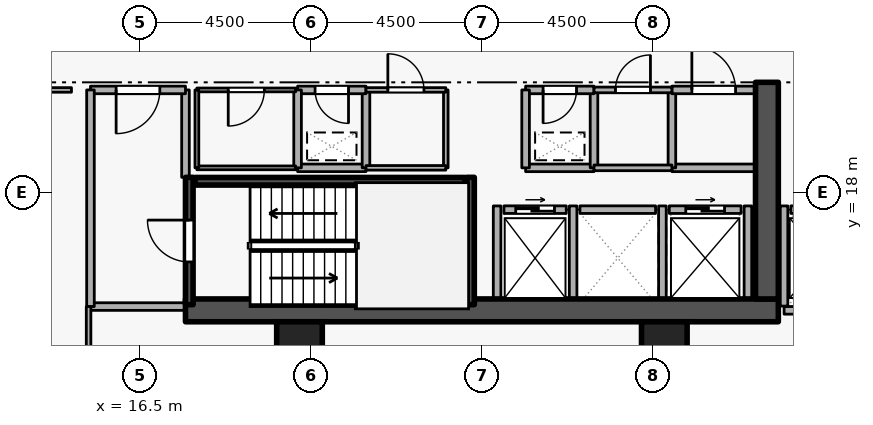
"""IFC4 building model, lengths in metres.
Left out: names, types, materials, properties, quantities, classifications, styles, units other than length and angle.
Written with IfcOpenShell. Run it as: python <this file> out.ifc"""

import sys

from ifc_helpers import new_model, si_unit, direction, frame, frame_2d, origin, origin_2d, place, context, subcontext, project, spatial, rectangle, extrude, element, fill, save


model = new_model("IFC4")
c1 = context("Model", 3, precision=1e-05, world=origin(), true_north=direction((0.0, 1.0)))
c2 = subcontext(c1, "Body", "Model", "MODEL_VIEW")
j1 = project(units=[si_unit("LENGTHUNIT", "METRE"), si_unit("PLANEANGLEUNIT", "RADIAN")], contexts=[c1])
p1 = place(None, origin())
s1 = spatial("IfcSite", under=j1, at=p1, CompositionType="ELEMENT")
p2 = place(p1, origin())
s2 = spatial("IfcBuilding", under=s1, at=p2, CompositionType="ELEMENT")
p3 = place(p2, frame((0.0, 0.0, 101.7)))
s3 = spatial("IfcBuildingStorey", under=s2, at=p3, CompositionType="ELEMENT", Elevation=101.7)
p4 = place(p3, frame((17.7, 14.9, 0.0), z_axis=(0.0, 0.0, 1.0), x_axis=(1.0, 0.0, 0.0)))
e1 = element("IfcWall", 1, at=p4, inside=s3, PredefinedType="SHEAR", context=c2, shape_type="SweptSolid", body=[
    extrude(rectangle(XDim=15.6, YDim=0.6, at=frame_2d((7.8, 0.0))), origin(), (0.0, 0.0, 1.0), 3.6),
])
p5 = place(p3, frame((33.0, 15.2, 0.0), z_axis=(0.0, 0.0, 1.0), x_axis=(0.0, 1.0, 0.0)))
e2 = element("IfcWall", 2, at=p5, inside=s3, PredefinedType="SHEAR", context=c2, shape_type="SweptSolid", body=[
    extrude(rectangle(XDim=5.7, YDim=0.6, at=frame_2d((2.85, 0.0))), origin(), (0.0, 0.0, 1.0), 3.6),
])
for number, where, z_axis, x_axis in (
    (3, (20.7, 14.0, 0.0), (0.0, 0.0, 1.0), (1.0, 0.0, 0.0)),
    (4, (30.3, 14.0, 0.0), (0.0, 0.0, 1.0), (1.0, 0.0, 0.0)),
):
    element("IfcColumn", number, at=place(p3, frame(where, z_axis=z_axis, x_axis=x_axis)), inside=s3, PredefinedType="COLUMN", context=c2, shape_type="SweptSolid", body=[
        extrude(rectangle(XDim=1.2, YDim=1.2, at=origin_2d()), origin(), (0.0, 0.0, 1.0), 3.6),
    ])
p6 = place(p3, frame((26.08, 17.55, 0.0), z_axis=(0.0, 0.0, 1.0), x_axis=(1.0, 0.0, 0.0)))
e5 = element("IfcWall", 5, at=p6, inside=s3, PredefinedType="STANDARD", context=c2, shape_type="SweptSolid", body=[
    extrude(rectangle(XDim=1.64, YDim=0.2, at=frame_2d((0.82, 0.0))), origin(), (0.0, 0.0, 1.0), 3.34),
])
p7 = place(p6, frame((0.31, 0.0, 0.0)))
e6 = element("IfcOpeningElement", 6, at=p7, cuts=e5, PredefinedType="OPENING", context=c2, shape_type="SweptSolid", body=[
    extrude(rectangle(XDim=1.02, YDim=2.06, at=frame_2d((0.51, 1.03))), frame((0.0, 0.11, 0.0), z_axis=(0.0, -1.0, 0.0), x_axis=(1.0, 0.0, 0.0)), (0.0, 0.0, 1.0), 0.22),
])
p8 = place(p3, frame((28.08, 17.55, 0.0), z_axis=(0.0, 0.0, 1.0), x_axis=(1.0, 0.0, 0.0)))
e7 = element("IfcWall", 7, at=p8, inside=s3, PredefinedType="STANDARD", context=c2, shape_type="SweptSolid", body=[
    extrude(rectangle(XDim=1.99, YDim=0.2, at=frame_2d((0.995, 0.0))), origin(), (0.0, 0.0, 1.0), 3.34),
])
p9 = place(p3, frame((30.43, 17.55, 0.0), z_axis=(0.0, 0.0, 1.0), x_axis=(1.0, 0.0, 0.0)))
e8 = element("IfcWall", 8, at=p9, inside=s3, PredefinedType="STANDARD", context=c2, shape_type="SweptSolid", body=[
    extrude(rectangle(XDim=1.89, YDim=0.2, at=frame_2d((0.945, 0.0))), origin(), (0.0, 0.0, 1.0), 3.34),
])
p10 = place(p9, frame((0.435, 0.0, 0.0)))
e9 = element("IfcOpeningElement", 9, at=p10, cuts=e8, PredefinedType="OPENING", context=c2, shape_type="SweptSolid", body=[
    extrude(rectangle(XDim=1.02, YDim=2.06, at=frame_2d((0.51, 1.03))), frame((0.0, 0.11, 0.0), z_axis=(0.0, -1.0, 0.0), x_axis=(1.0, 0.0, 0.0)), (0.0, 0.0, 1.0), 0.22),
])
p11 = place(p3, frame((33.63, 17.55, 0.0), z_axis=(0.0, 0.0, 1.0), x_axis=(1.0, 0.0, 0.0)))
e10 = element("IfcWall", 10, at=p11, inside=s3, PredefinedType="STANDARD", context=c2, shape_type="SweptSolid", body=[
    extrude(rectangle(XDim=1.74, YDim=0.2, at=frame_2d((0.87, 0.0))), origin(), (0.0, 0.0, 1.0), 3.34),
])
p12 = place(p11, frame((0.36, 0.0, 0.0)))
e11 = element("IfcOpeningElement", 11, at=p12, cuts=e10, PredefinedType="OPENING", context=c2, shape_type="SweptSolid", body=[
    extrude(rectangle(XDim=1.02, YDim=2.06, at=frame_2d((0.51, 1.03))), frame((0.0, 0.11, 0.0), z_axis=(0.0, -1.0, 0.0), x_axis=(1.0, 0.0, 0.0)), (0.0, 0.0, 1.0), 0.22),
])
for number, where, z_axis, x_axis in (
    (12, (27.9, 15.212, 0.0), (0.0, 0.0, 1.0), (0.0, 1.0, 0.0)),
    (13, (25.9, 15.212, 0.0), (0.0, 0.0, 1.0), (0.0, 1.0, 0.0)),
    (14, (30.25, 15.212, 0.0), (0.0, 0.0, 1.0), (0.0, 1.0, 0.0)),
    (15, (32.5, 15.212, 0.0), (0.0, 0.0, 1.0), (0.0, 1.0, 0.0)),
):
    element("IfcWall", number, at=place(p3, frame(where, z_axis=z_axis, x_axis=x_axis)), inside=s3, PredefinedType="STANDARD", context=c2, shape_type="SweptSolid", body=[
        extrude(rectangle(XDim=2.436, YDim=0.2, at=frame_2d((1.218, 0.0))), origin(), (0.0, 0.0, 1.0), 3.34),
    ])
p13 = place(p3, frame((33.452, 14.9, 0.0), z_axis=(0.0, 0.0, 1.0), x_axis=(1.0, 0.0, 0.0)))
e16 = element("IfcWall", 16, at=p13, inside=s3, PredefinedType="STANDARD", context=c2, shape_type="SweptSolid", body=[
    extrude(rectangle(XDim=4.196, YDim=0.2, at=frame_2d((2.098, 0.0))), origin(), (0.0, 0.0, 1.0), 3.34),
])
p14 = place(p3, frame((33.45, 15.012, 0.0), z_axis=(0.0, 0.0, 1.0), x_axis=(0.0, 1.0, 0.0)))
e17 = element("IfcWall", 17, at=p14, inside=s3, PredefinedType="STANDARD", context=c2, shape_type="SweptSolid", body=[
    extrude(rectangle(XDim=2.636, YDim=0.2, at=frame_2d((1.318, 0.0))), origin(), (0.0, 0.0, 1.0), 3.34),
])
p15 = place(p3, frame((17.8, 15.05, 0.0), z_axis=(0.0, 0.0, 1.0), x_axis=(0.0, 1.0, 0.0)))
e18 = element("IfcWall", 18, at=p15, inside=s3, PredefinedType="SHEAR", context=c2, shape_type="SweptSolid", body=[
    extrude(rectangle(XDim=3.35, YDim=0.2, at=frame_2d((1.675, 0.0))), origin(), (0.0, 0.0, 1.0), 3.6),
])
p16 = place(p15, frame((1.125, 0.0, 0.0)))
e19 = element("IfcOpeningElement", 19, at=p16, cuts=e18, PredefinedType="OPENING", context=c2, shape_type="SweptSolid", body=[
    extrude(rectangle(XDim=1.1, YDim=2.1, at=frame_2d((0.55, 1.05))), frame((0.0, 0.11, 0.0), z_axis=(0.0, -1.0, 0.0), x_axis=(1.0, 0.0, 0.0)), (0.0, 0.0, 1.0), 0.22),
])
p17 = place(p3, frame((25.2, 18.4, 0.0), z_axis=(0.0, 0.0, 1.0), x_axis=(0.0, -1.0, 0.0)))
e20 = element("IfcWall", 20, at=p17, inside=s3, PredefinedType="SHEAR", context=c2, shape_type="SweptSolid", body=[
    extrude(rectangle(XDim=3.35, YDim=0.2, at=frame_2d((1.675, 0.0))), origin(), (0.0, 0.0, 1.0), 3.6),
])
p18 = place(p3, frame((25.05, 18.297, 0.0), z_axis=(0.0, 0.0, 1.0), x_axis=(-1.0, 0.0, 0.0)))
e21 = element("IfcWall", 21, at=p18, inside=s3, PredefinedType="SHEAR", context=c2, shape_type="SweptSolid", body=[
    extrude(rectangle(XDim=7.1, YDim=0.2, at=frame_2d((3.55, 0.0))), origin(), (0.0, 0.0, 1.0), 3.6),
])
p19 = place(p3, frame((15.2, 15.0, 0.0), z_axis=(0.0, 0.0, 1.0), x_axis=(1.0, 0.0, 0.0)))
e22 = element("IfcWall", 22, at=p19, inside=s3, PredefinedType="STANDARD", context=c2, shape_type="SweptSolid", body=[
    extrude(rectangle(XDim=2.5, YDim=0.2, at=frame_2d((1.25, 0.0))), origin(), (0.0, 0.0, 1.0), 3.34),
])
p20 = place(p3, frame((17.7, 18.4, 0.0), z_axis=(0.0, 0.0, 1.0), x_axis=(0.0, 1.0, 0.0)))
e23 = element("IfcWall", 23, at=p20, inside=s3, PredefinedType="STANDARD", context=c2, shape_type="SweptSolid", body=[
    extrude(rectangle(XDim=2.3, YDim=0.2, at=frame_2d((1.15, 0.0))), origin(), (0.0, 0.0, 1.0), 2.545),
])
p21 = place(p3, frame((17.7, 20.7, 0.0), z_axis=(0.0, 0.0, 1.0), x_axis=(-1.0, 0.0, 0.0)))
e24 = element("IfcWall", 24, at=p21, inside=s3, PredefinedType="STANDARD", context=c2, shape_type="SweptSolid", body=[
    extrude(rectangle(XDim=2.5, YDim=0.2, at=frame_2d((1.25, 0.0))), origin(), (0.0, 0.0, 1.0), 3.34),
])
p22 = place(p21, frame((0.675, 0.0, 0.0)))
e25 = element("IfcOpeningElement", 25, at=p22, cuts=e24, PredefinedType="OPENING", context=c2, shape_type="SweptSolid", body=[
    extrude(rectangle(XDim=1.15, YDim=2.1, at=frame_2d((0.575, 1.05))), frame((0.0, 0.11, 0.0), z_axis=(0.0, -1.0, 0.0), x_axis=(1.0, 0.0, 0.0)), (0.0, 0.0, 1.0), 0.22),
])
p23 = place(p3, frame((15.2, 20.7, 0.0), z_axis=(0.0, 0.0, 1.0), x_axis=(0.0, -1.0, 0.0)))
e26 = element("IfcWall", 26, at=p23, inside=s3, PredefinedType="STANDARD", context=c2, shape_type="SweptSolid", body=[
    extrude(rectangle(XDim=5.7, YDim=0.2, at=frame_2d((2.85, 0.0))), origin(), (0.0, 0.0, 1.0), 3.34),
])
p24 = place(p3, frame((26.65, 18.65, 0.0), z_axis=(0.0, 0.0, 1.0), x_axis=(1.0, 0.0, 0.0)))
e27 = element("IfcWall", 27, at=p24, inside=s3, PredefinedType="STANDARD", context=c2, shape_type="SweptSolid", body=[
    extrude(rectangle(XDim=1.8, YDim=0.2, at=frame_2d((0.9, 0.0))), origin(), (0.0, 0.0, 1.0), 3.34),
])
p25 = place(p3, frame((28.45, 18.65, 0.0), z_axis=(0.0, 0.0, 1.0), x_axis=(0.0, 1.0, 0.0)))
e28 = element("IfcWall", 28, at=p25, inside=s3, PredefinedType="STANDARD", context=c2, shape_type="SweptSolid", body=[
    extrude(rectangle(XDim=2.05, YDim=0.2, at=frame_2d((1.025, 0.0))), origin(), (0.0, 0.0, 1.0), 3.34),
])
p26 = place(p3, frame((28.45, 20.7, 0.0), z_axis=(0.0, 0.0, 1.0), x_axis=(-1.0, 0.0, 0.0)))
e29 = element("IfcWall", 29, at=p26, inside=s3, PredefinedType="STANDARD", context=c2, shape_type="SweptSolid", body=[
    extrude(rectangle(XDim=1.8, YDim=0.2, at=frame_2d((0.9, 0.0))), origin(), (0.0, 0.0, 1.0), 3.34),
])
p27 = place(p26, frame((0.46, 0.0, 0.0)))
e30 = element("IfcOpeningElement", 30, at=p27, cuts=e29, PredefinedType="OPENING", context=c2, shape_type="SweptSolid", body=[
    extrude(rectangle(XDim=0.88, YDim=2.04, at=frame_2d((0.44, 1.02))), frame((0.0, 0.11, 0.0), z_axis=(0.0, -1.0, 0.0), x_axis=(1.0, 0.0, 0.0)), (0.0, 0.0, 1.0), 0.22),
])
p28 = place(p3, frame((26.65, 20.7, 0.0), z_axis=(0.0, 0.0, 1.0), x_axis=(0.0, -1.0, 0.0)))
e31 = element("IfcWall", 31, at=p28, inside=s3, PredefinedType="STANDARD", context=c2, shape_type="SweptSolid", body=[
    extrude(rectangle(XDim=2.05, YDim=0.2, at=frame_2d((1.025, 0.0))), origin(), (0.0, 0.0, 1.0), 3.34),
])
p29 = place(p3, frame((20.65, 18.65, 0.0), z_axis=(0.0, 0.0, 1.0), x_axis=(1.0, 0.0, 0.0)))
e32 = element("IfcWall", 32, at=p29, inside=s3, PredefinedType="STANDARD", context=c2, shape_type="SweptSolid", body=[
    extrude(rectangle(XDim=1.8, YDim=0.2, at=frame_2d((0.9, 0.0))), origin(), (0.0, 0.0, 1.0), 3.34),
])
p30 = place(p3, frame((22.45, 18.65, 0.0), z_axis=(0.0, 0.0, 1.0), x_axis=(0.0, 1.0, 0.0)))
e33 = element("IfcWall", 33, at=p30, inside=s3, PredefinedType="STANDARD", context=c2, shape_type="SweptSolid", body=[
    extrude(rectangle(XDim=2.05, YDim=0.2, at=frame_2d((1.025, 0.0))), origin(), (0.0, 0.0, 1.0), 3.34),
])
p31 = place(p3, frame((22.45, 20.7, 0.0), z_axis=(0.0, 0.0, 1.0), x_axis=(-1.0, 0.0, 0.0)))
e34 = element("IfcWall", 34, at=p31, inside=s3, PredefinedType="STANDARD", context=c2, shape_type="SweptSolid", body=[
    extrude(rectangle(XDim=1.8, YDim=0.2, at=frame_2d((0.9, 0.0))), origin(), (0.0, 0.0, 1.0), 3.34),
])
p32 = place(p31, frame((0.46, 0.0, 0.0)))
e35 = element("IfcOpeningElement", 35, at=p32, cuts=e34, PredefinedType="OPENING", context=c2, shape_type="SweptSolid", body=[
    extrude(rectangle(XDim=0.88, YDim=2.04, at=frame_2d((0.44, 1.02))), frame((0.0, 0.11, 0.0), z_axis=(0.0, -1.0, 0.0), x_axis=(1.0, 0.0, 0.0)), (0.0, 0.0, 1.0), 0.22),
])
p33 = place(p3, frame((20.65, 20.7, 0.0), z_axis=(0.0, 0.0, 1.0), x_axis=(0.0, -1.0, 0.0)))
e36 = element("IfcWall", 36, at=p33, inside=s3, PredefinedType="STANDARD", context=c2, shape_type="SweptSolid", body=[
    extrude(rectangle(XDim=2.05, YDim=0.2, at=frame_2d((1.025, 0.0))), origin(), (0.0, 0.0, 1.0), 3.34),
])
p34 = place(p3, frame((32.7, 18.65, 0.0), z_axis=(0.0, 0.0, 1.0), x_axis=(-1.0, 0.0, 0.0)))
e37 = element("IfcWall", 37, at=p34, inside=s3, PredefinedType="STANDARD", context=c2, shape_type="SweptSolid", body=[
    extrude(rectangle(XDim=2.2, YDim=0.2, at=frame_2d((1.1, 0.0))), origin(), (0.0, 0.0, 1.0), 3.34),
])
p35 = place(p3, frame((30.5, 18.65, 0.0), z_axis=(0.0, 0.0, 1.0), x_axis=(0.0, 1.0, 0.0)))
e38 = element("IfcWall", 38, at=p35, inside=s3, PredefinedType="STANDARD", context=c2, shape_type="SweptSolid", body=[
    extrude(rectangle(XDim=2.05, YDim=0.2, at=frame_2d((1.025, 0.0))), origin(), (0.0, 0.0, 1.0), 3.34),
])
p36 = place(p3, frame((30.5, 20.7, 0.0), z_axis=(0.0, 0.0, 1.0), x_axis=(1.0, 0.0, 0.0)))
e39 = element("IfcWall", 39, at=p36, inside=s3, PredefinedType="STANDARD", context=c2, shape_type="SweptSolid", body=[
    extrude(rectangle(XDim=2.2, YDim=0.2, at=frame_2d((1.1, 0.0))), origin(), (0.0, 0.0, 1.0), 3.34),
])
p37 = place(p36, frame((0.525, 0.0, 0.0)))
e40 = element("IfcOpeningElement", 40, at=p37, cuts=e39, PredefinedType="OPENING", context=c2, shape_type="SweptSolid", body=[
    extrude(rectangle(XDim=1.15, YDim=2.1, at=frame_2d((0.575, 1.05))), frame((0.0, 0.11, 0.0), z_axis=(0.0, -1.0, 0.0), x_axis=(1.0, 0.0, 0.0)), (0.0, 0.0, 1.0), 0.22),
])
p38 = place(p3, frame((18.0, 18.65, 0.0), z_axis=(0.0, 0.0, 1.0), x_axis=(1.0, 0.0, 0.0)))
e41 = element("IfcWall", 41, at=p38, inside=s3, PredefinedType="PARTITIONING", context=c2, shape_type="SweptSolid", body=[
    extrude(rectangle(XDim=2.6, YDim=0.1, at=frame_2d((1.3, 0.0))), origin(), (0.0, 0.0, 1.0), 3.34),
])
p39 = place(p3, frame((20.6, 20.7, 0.0), z_axis=(0.0, 0.0, 1.0), x_axis=(-1.0, 0.0, 0.0)))
e42 = element("IfcWall", 42, at=p39, inside=s3, PredefinedType="PARTITIONING", context=c2, shape_type="SweptSolid", body=[
    extrude(rectangle(XDim=2.6, YDim=0.1, at=frame_2d((1.3, 0.0))), origin(), (0.0, 0.0, 1.0), 3.34),
])
p40 = place(p39, frame((0.825, 0.0, 0.0)))
e43 = element("IfcOpeningElement", 43, at=p40, cuts=e42, PredefinedType="OPENING", context=c2, shape_type="SweptSolid", body=[
    extrude(rectangle(XDim=0.95, YDim=2.1, at=frame_2d((0.475, 1.05))), frame((0.0, 0.06, 0.0), z_axis=(0.0, -1.0, 0.0), x_axis=(1.0, 0.0, 0.0)), (0.0, 0.0, 1.0), 0.12),
])
p41 = place(p3, frame((18.0, 20.7, 0.0), z_axis=(0.0, 0.0, 1.0), x_axis=(0.0, -1.0, 0.0)))
e44 = element("IfcWall", 44, at=p41, inside=s3, PredefinedType="PARTITIONING", context=c2, shape_type="SweptSolid", body=[
    extrude(rectangle(XDim=2.05, YDim=0.1, at=frame_2d((1.025, 0.0))), origin(), (0.0, 0.0, 1.0), 2.545),
])
p42 = place(p3, frame((24.55, 20.7, 0.0), z_axis=(0.0, 0.0, 1.0), x_axis=(0.0, -1.0, 0.0)))
e45 = element("IfcWall", 45, at=p42, inside=s3, PredefinedType="PARTITIONING", context=c2, shape_type="SweptSolid", body=[
    extrude(rectangle(XDim=2.05, YDim=0.12, at=frame_2d((1.025, 0.0))), origin(), (0.0, 0.0, 1.0), 3.34),
])
p43 = place(p3, frame((24.55, 18.65, 0.0), z_axis=(0.0, 0.0, 1.0), x_axis=(-1.0, 0.0, 0.0)))
e46 = element("IfcWall", 46, at=p43, inside=s3, PredefinedType="PARTITIONING", context=c2, shape_type="SweptSolid", body=[
    extrude(rectangle(XDim=2.1, YDim=0.12, at=frame_2d((1.05, 0.0))), origin(), (0.0, 0.0, 1.0), 3.34),
])
p44 = place(p3, frame((22.45, 20.7, 0.0), z_axis=(0.0, 0.0, 1.0), x_axis=(1.0, 0.0, 0.0)))
e47 = element("IfcWall", 47, at=p44, inside=s3, PredefinedType="PARTITIONING", context=c2, shape_type="SweptSolid", body=[
    extrude(rectangle(XDim=2.1, YDim=0.12, at=frame_2d((1.05, 0.0))), origin(), (0.0, 0.0, 1.0), 3.34),
])
p45 = place(p44, frame((0.575, 0.0, 0.0)))
e48 = element("IfcOpeningElement", 48, at=p45, cuts=e47, PredefinedType="OPENING", context=c2, shape_type="SweptSolid", body=[
    extrude(rectangle(XDim=0.95, YDim=2.1, at=frame_2d((0.475, 1.05))), frame((0.0, 0.07, 0.0), z_axis=(0.0, -1.0, 0.0), x_axis=(1.0, 0.0, 0.0)), (0.0, 0.0, 1.0), 0.14),
])
p46 = place(p3, frame((30.5, 18.65, 0.0), z_axis=(0.0, 0.0, 1.0), x_axis=(-1.0, 0.0, 0.0)))
e49 = element("IfcWall", 49, at=p46, inside=s3, PredefinedType="PARTITIONING", context=c2, shape_type="SweptSolid", body=[
    extrude(rectangle(XDim=2.05, YDim=0.15, at=frame_2d((1.025, 0.0))), origin(), (0.0, 0.0, 1.0), 3.34),
])
p47 = place(p3, frame((28.45, 20.7, 0.0), z_axis=(0.0, 0.0, 1.0), x_axis=(1.0, 0.0, 0.0)))
e50 = element("IfcWall", 50, at=p47, inside=s3, PredefinedType="PARTITIONING", context=c2, shape_type="SweptSolid", body=[
    extrude(rectangle(XDim=2.05, YDim=0.15, at=frame_2d((1.025, 0.0))), origin(), (0.0, 0.0, 1.0), 3.34),
])
p48 = place(p47, frame((0.565, 0.0, 0.0)))
e51 = element("IfcOpeningElement", 51, at=p48, cuts=e50, PredefinedType="OPENING", context=c2, shape_type="SweptSolid", body=[
    extrude(rectangle(XDim=0.92, YDim=2.08, at=frame_2d((0.46, 1.04))), frame((0.0, 0.085, 0.0), z_axis=(0.0, -1.0, 0.0), x_axis=(1.0, 0.0, 0.0)), (0.0, 0.0, 1.0), 0.17),
])
p49 = place(p3, frame((13.25, 20.7, 0.0), z_axis=(0.0, 0.0, 1.0), x_axis=(1.0, 0.0, 0.0)))
e52 = element("IfcWall", 52, at=p49, inside=s3, PredefinedType="PARTITIONING", context=c2, shape_type="SweptSolid", body=[
    extrude(rectangle(XDim=1.45, YDim=0.12, at=frame_2d((0.725, 0.0))), origin(), (0.0, 0.0, 1.0), 3.34),
])
p50 = place(p3, frame((15.15, 15.0, 0.0), z_axis=(0.0, 0.0, 1.0), x_axis=(0.0, -1.0, 0.0)))
e53 = element("IfcWall", 53, at=p50, inside=s3, PredefinedType="PARTITIONING", context=c2, shape_type="SweptSolid", body=[
    extrude(rectangle(XDim=5.92, YDim=0.12, at=frame_2d((2.96, 0.0))), origin(), (0.0, 0.0, 1.0), 3.34),
])
p51 = place(p7, origin())
e54 = element("IfcDoor", 54, at=p51, inside=s3, OperationType="SLIDING_TO_LEFT", PredefinedType="DOOR", context=c2, shape_type="SweptSolid", body=[
    extrude(rectangle(XDim=1.02, YDim=2.06, at=frame_2d((0.51, 1.03))), frame((0.0, 0.025, 0.0), z_axis=(0.0, -1.0, 0.0), x_axis=(1.0, 0.0, 0.0)), (0.0, 0.0, 1.0), 0.05),
])
fill(e6, e54)
p52 = place(p10, origin())
e55 = element("IfcDoor", 55, at=p52, inside=s3, OperationType="SLIDING_TO_LEFT", PredefinedType="DOOR", context=c2, shape_type="SweptSolid", body=[
    extrude(rectangle(XDim=1.02, YDim=2.06, at=frame_2d((0.51, 1.03))), frame((0.0, 0.025, 0.0), z_axis=(0.0, -1.0, 0.0), x_axis=(1.0, 0.0, 0.0)), (0.0, 0.0, 1.0), 0.05),
])
fill(e9, e55)
p53 = place(p16, origin())
e56 = element("IfcDoor", 56, at=p53, inside=s3, OperationType="SINGLE_SWING_RIGHT", PredefinedType="DOOR", context=c2, shape_type="SweptSolid", body=[
    extrude(rectangle(XDim=1.1, YDim=2.1, at=frame_2d((0.55, 1.05))), frame((0.0, 0.025, 0.0), z_axis=(0.0, -1.0, 0.0), x_axis=(1.0, 0.0, 0.0)), (0.0, 0.0, 1.0), 0.05),
])
fill(e19, e56)
p54 = place(p22, origin())
e57 = element("IfcDoor", 57, at=p54, inside=s3, OperationType="SINGLE_SWING_RIGHT", PredefinedType="DOOR", context=c2, shape_type="SweptSolid", body=[
    extrude(rectangle(XDim=1.15, YDim=2.1, at=frame_2d((0.575, 1.05))), frame((0.0, 0.025, 0.0), z_axis=(0.0, -1.0, 0.0), x_axis=(1.0, 0.0, 0.0)), (0.0, 0.0, 1.0), 0.05),
])
fill(e25, e57)
p55 = place(p27, origin())
e58 = element("IfcDoor", 58, at=p55, inside=s3, OperationType="SINGLE_SWING_RIGHT", PredefinedType="DOOR", context=c2, shape_type="SweptSolid", body=[
    extrude(rectangle(XDim=0.88, YDim=2.04, at=frame_2d((0.44, 1.02))), frame((0.0, 0.025, 0.0), z_axis=(0.0, -1.0, 0.0), x_axis=(1.0, 0.0, 0.0)), (0.0, 0.0, 1.0), 0.05),
])
fill(e30, e58)
p56 = place(p32, origin())
e59 = element("IfcDoor", 59, at=p56, inside=s3, OperationType="SINGLE_SWING_LEFT", PredefinedType="DOOR", context=c2, shape_type="SweptSolid", body=[
    extrude(rectangle(XDim=0.88, YDim=2.04, at=frame_2d((0.44, 1.02))), frame((0.0, 0.025, 0.0), z_axis=(0.0, -1.0, 0.0), x_axis=(1.0, 0.0, 0.0)), (0.0, 0.0, 1.0), 0.05),
])
fill(e35, e59)
p57 = place(p40, origin())
e60 = element("IfcDoor", 60, at=p57, inside=s3, OperationType="SINGLE_SWING_RIGHT", PredefinedType="DOOR", context=c2, shape_type="SweptSolid", body=[
    extrude(rectangle(XDim=0.95, YDim=2.1, at=frame_2d((0.475, 1.05))), frame((0.0, 0.025, 0.0), z_axis=(0.0, -1.0, 0.0), x_axis=(1.0, 0.0, 0.0)), (0.0, 0.0, 1.0), 0.05),
])
fill(e43, e60)
p58 = place(p45, origin())
e61 = element("IfcDoor", 61, at=p58, inside=s3, OperationType="SINGLE_SWING_LEFT", PredefinedType="DOOR", context=c2, shape_type="SweptSolid", body=[
    extrude(rectangle(XDim=0.95, YDim=2.1, at=frame_2d((0.475, 1.05))), frame((0.0, 0.025, 0.0), z_axis=(0.0, -1.0, 0.0), x_axis=(1.0, 0.0, 0.0)), (0.0, 0.0, 1.0), 0.05),
])
fill(e48, e61)
p59 = place(p48, origin())
e62 = element("IfcDoor", 62, at=p59, inside=s3, OperationType="SINGLE_SWING_RIGHT", PredefinedType="DOOR", context=c2, shape_type="SweptSolid", body=[
    extrude(rectangle(XDim=0.92, YDim=2.08, at=frame_2d((0.46, 1.04))), frame((0.0, 0.025, 0.0), z_axis=(0.0, -1.0, 0.0), x_axis=(1.0, 0.0, 0.0)), (0.0, 0.0, 1.0), 0.05),
])
fill(e51, e62)
p60 = place(p37, origin())
e63 = element("IfcDoor", 63, at=p60, inside=s3, OperationType="SINGLE_SWING_LEFT", PredefinedType="DOOR", context=c2, shape_type="SweptSolid", body=[
    extrude(rectangle(XDim=1.15, YDim=2.1, at=frame_2d((0.575, 1.05))), frame((0.0, 0.025, 0.0), z_axis=(0.0, -1.0, 0.0), x_axis=(1.0, 0.0, 0.0)), (0.0, 0.0, 1.0), 0.05),
])
fill(e40, e63)
save(model, sys.argv[1])
